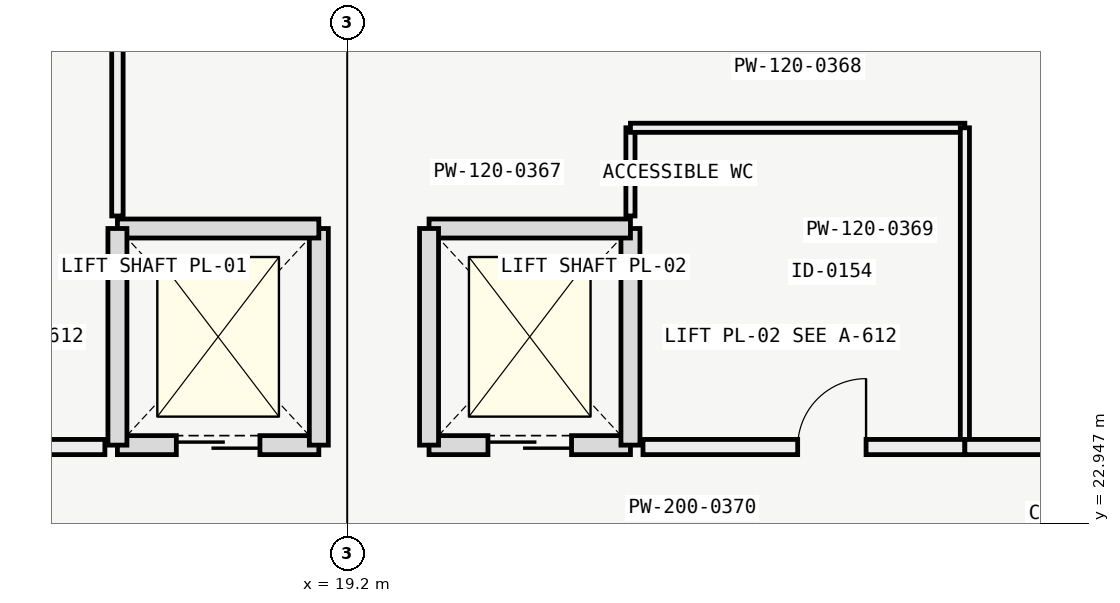
"""IFC4 building model, lengths in metres.
Left out: names, types, materials, properties, quantities, classifications, styles, units other than length and angle.
Written with IfcOpenShell. Run it as: python <this file> out.ifc"""

import sys

from ifc_helpers import new_model, si_unit, direction, frame, frame_2d, origin, place, context, subcontext, project, spatial, rectangle, extrude, element, fill, save


model = new_model("IFC4")
c1 = context("Model", 3, precision=1e-05, world=origin(), true_north=direction((0.0, 1.0)))
c2 = subcontext(c1, "Body", "Model", "MODEL_VIEW")
j1 = project(units=[si_unit("LENGTHUNIT", "METRE"), si_unit("PLANEANGLEUNIT", "RADIAN")], contexts=[c1])
p1 = place(None, origin())
s1 = spatial("IfcSite", under=j1, at=p1, CompositionType="ELEMENT")
p2 = place(p1, origin())
s2 = spatial("IfcBuilding", under=s1, at=p2, CompositionType="ELEMENT")
p3 = place(p2, frame((0.0, 0.0, 5.4)))
s3 = spatial("IfcBuildingStorey", under=s2, at=p3, CompositionType="ELEMENT", Elevation=5.4)
p4 = place(p3, frame((16.175, 23.975, 0.0), z_axis=(0.0, 0.0, 1.0), x_axis=(1.0, 0.0, 0.0)))
e1 = element("IfcWall", 1, at=p4, inside=s3, PredefinedType="SOLIDWALL", context=c2, shape_type="SweptSolid", body=[
    extrude(rectangle(XDim=2.65, YDim=0.25, at=frame_2d((1.325, 0.0))), origin(), (0.0, 0.0, 1.0), 3.92),
])
p5 = place(p4, frame((0.775, 0.0, 0.0)))
e2 = element("IfcOpeningElement", 2, at=p5, cuts=e1, PredefinedType="OPENING", context=c2, shape_type="SweptSolid", body=[
    extrude(rectangle(XDim=1.1, YDim=2.1, at=frame_2d((0.55, 1.05))), frame((0.0, 0.135, 0.0), z_axis=(0.0, -1.0, 0.0), x_axis=(1.0, 0.0, 0.0)), (0.0, 0.0, 1.0), 0.27),
])
p6 = place(p3, frame((18.825, 23.975, 0.0), z_axis=(0.0, 0.0, 1.0), x_axis=(0.0, 1.0, 0.0)))
e3 = element("IfcWall", 3, at=p6, inside=s3, PredefinedType="SOLIDWALL", context=c2, shape_type="SweptSolid", body=[
    extrude(rectangle(XDim=2.85, YDim=0.25, at=frame_2d((1.425, 0.0))), origin(), (0.0, 0.0, 1.0), 3.92),
])
p7 = place(p3, frame((18.825, 26.825, 0.0), z_axis=(0.0, 0.0, 1.0), x_axis=(-1.0, 0.0, 0.0)))
e4 = element("IfcWall", 4, at=p7, inside=s3, PredefinedType="SOLIDWALL", context=c2, shape_type="SweptSolid", body=[
    extrude(rectangle(XDim=2.65, YDim=0.25, at=frame_2d((1.325, 0.0))), origin(), (0.0, 0.0, 1.0), 3.92),
])
p8 = place(p3, frame((16.175, 26.825, 0.0), z_axis=(0.0, 0.0, 1.0), x_axis=(0.0, -1.0, 0.0)))
e5 = element("IfcWall", 5, at=p8, inside=s3, PredefinedType="SOLIDWALL", context=c2, shape_type="SweptSolid", body=[
    extrude(rectangle(XDim=2.85, YDim=0.25, at=frame_2d((1.425, 0.0))), origin(), (0.0, 0.0, 1.0), 3.92),
])
p9 = place(p3, frame((20.275, 23.975, 0.0), z_axis=(0.0, 0.0, 1.0), x_axis=(1.0, 0.0, 0.0)))
e6 = element("IfcWall", 6, at=p9, inside=s3, PredefinedType="SOLIDWALL", context=c2, shape_type="SweptSolid", body=[
    extrude(rectangle(XDim=2.65, YDim=0.25, at=frame_2d((1.325, 0.0))), origin(), (0.0, 0.0, 1.0), 3.92),
])
p10 = place(p9, frame((0.775, 0.0, 0.0)))
e7 = element("IfcOpeningElement", 7, at=p10, cuts=e6, PredefinedType="OPENING", context=c2, shape_type="SweptSolid", body=[
    extrude(rectangle(XDim=1.1, YDim=2.1, at=frame_2d((0.55, 1.05))), frame((0.0, 0.135, 0.0), z_axis=(0.0, -1.0, 0.0), x_axis=(1.0, 0.0, 0.0)), (0.0, 0.0, 1.0), 0.27),
])
p11 = place(p3, frame((22.925, 23.975, 0.0), z_axis=(0.0, 0.0, 1.0), x_axis=(0.0, 1.0, 0.0)))
e8 = element("IfcWall", 8, at=p11, inside=s3, PredefinedType="SOLIDWALL", context=c2, shape_type="SweptSolid", body=[
    extrude(rectangle(XDim=2.85, YDim=0.25, at=frame_2d((1.425, 0.0))), origin(), (0.0, 0.0, 1.0), 3.92),
])
p12 = place(p3, frame((22.925, 26.825, 0.0), z_axis=(0.0, 0.0, 1.0), x_axis=(-1.0, 0.0, 0.0)))
e9 = element("IfcWall", 9, at=p12, inside=s3, PredefinedType="SOLIDWALL", context=c2, shape_type="SweptSolid", body=[
    extrude(rectangle(XDim=2.65, YDim=0.25, at=frame_2d((1.325, 0.0))), origin(), (0.0, 0.0, 1.0), 3.92),
])
p13 = place(p3, frame((20.275, 26.825, 0.0), z_axis=(0.0, 0.0, 1.0), x_axis=(0.0, -1.0, 0.0)))
e10 = element("IfcWall", 10, at=p13, inside=s3, PredefinedType="SOLIDWALL", context=c2, shape_type="SweptSolid", body=[
    extrude(rectangle(XDim=2.85, YDim=0.25, at=frame_2d((1.425, 0.0))), origin(), (0.0, 0.0, 1.0), 3.92),
])
p14 = place(p3, frame((22.925, 26.99, 0.0), z_axis=(0.0, 0.0, 1.0), x_axis=(0.0, 1.0, 0.0)))
e11 = element("IfcWall", 11, at=p14, inside=s3, PredefinedType="PARTITIONING", context=c2, shape_type="SweptSolid", body=[
    extrude(rectangle(XDim=1.16, YDim=0.12, at=frame_2d((0.58, 0.0))), origin(), (0.0, 0.0, 1.0), 3.85),
])
p15 = place(p3, frame((22.925, 28.15, 0.0), z_axis=(0.0, 0.0, 1.0), x_axis=(1.0, 0.0, 0.0)))
e12 = element("IfcWall", 12, at=p15, inside=s3, PredefinedType="PARTITIONING", context=c2, shape_type="SweptSolid", body=[
    extrude(rectangle(XDim=4.4, YDim=0.12, at=frame_2d((2.2, 0.0))), origin(), (0.0, 0.0, 1.0), 3.85),
])
p16 = place(p3, frame((27.325, 23.95, 0.0), z_axis=(0.0, 0.0, 1.0), x_axis=(0.0, 1.0, 0.0)))
e13 = element("IfcWall", 13, at=p16, inside=s3, PredefinedType="PARTITIONING", context=c2, shape_type="SweptSolid", body=[
    extrude(rectangle(XDim=4.2, YDim=0.12, at=frame_2d((2.1, 0.0))), origin(), (0.0, 0.0, 1.0), 3.85),
])
p17 = place(p3, frame((23.09, 23.95, 0.0), z_axis=(0.0, 0.0, 1.0), x_axis=(1.0, 0.0, 0.0)))
e14 = element("IfcWall", 14, at=p17, inside=s3, PredefinedType="PARTITIONING", context=c2, shape_type="SweptSolid", body=[
    extrude(rectangle(XDim=4.235, YDim=0.2, at=frame_2d((2.117, 0.0))), origin(), (0.0, 0.0, 1.0), 3.85),
])
p18 = place(p17, frame((2.035, 0.0, 0.0)))
e15 = element("IfcOpeningElement", 15, at=p18, cuts=e14, PredefinedType="OPENING", context=c2, shape_type="SweptSolid", body=[
    extrude(rectangle(XDim=0.9, YDim=2.05, at=frame_2d((0.45, 1.025))), frame((0.0, 0.11, 0.0), z_axis=(0.0, -1.0, 0.0), x_axis=(1.0, 0.0, 0.0)), (0.0, 0.0, 1.0), 0.22),
])
p19 = place(p3, frame((16.175, 26.99, 0.0), z_axis=(0.0, 0.0, 1.0), x_axis=(0.0, 1.0, 0.0)))
e16 = element("IfcWall", 16, at=p19, inside=s3, PredefinedType="PARTITIONING", context=c2, shape_type="SweptSolid", body=[
    extrude(rectangle(XDim=13.66, YDim=0.15, at=frame_2d((6.83, 0.0))), origin(), (0.0, 0.0, 1.0), 3.2),
])
p20 = place(p3, frame((0.15, 23.95, 0.0), z_axis=(0.0, 0.0, 1.0), x_axis=(1.0, 0.0, 0.0)))
e17 = element("IfcWall", 17, at=p20, inside=s3, PredefinedType="PARTITIONING", context=c2, shape_type="SweptSolid", body=[
    extrude(rectangle(XDim=15.86, YDim=0.2, at=frame_2d((7.93, 0.0))), origin(), (0.0, 0.0, 1.0), 3.25),
])
p21 = place(p20, frame((6.05, 0.0, 0.0)))
e18 = element("IfcOpeningElement", 18, at=p21, cuts=e17, PredefinedType="OPENING", context=c2, shape_type="SweptSolid", body=[
    extrude(rectangle(XDim=1.4, YDim=2.2, at=frame_2d((0.7, 1.1))), frame((0.0, 0.11, 0.0), z_axis=(0.0, -1.0, 0.0), x_axis=(1.0, 0.0, 0.0)), (0.0, 0.0, 1.0), 0.22),
])
p22 = place(p3, frame((27.325, 23.95, 0.0), z_axis=(0.0, 0.0, 1.0), x_axis=(1.0, 0.0, 0.0)))
e19 = element("IfcWall", 19, at=p22, inside=s3, PredefinedType="PARTITIONING", context=c2, shape_type="SweptSolid", body=[
    extrude(rectangle(XDim=6.985, YDim=0.2, at=frame_2d((3.493, 0.0))), origin(), (0.0, 0.0, 1.0), 3.25),
])
p23 = place(p22, frame((4.1, 0.0, 0.0)))
e20 = element("IfcOpeningElement", 20, at=p23, cuts=e19, PredefinedType="OPENING", context=c2, shape_type="SweptSolid", body=[
    extrude(rectangle(XDim=1.4, YDim=2.2, at=frame_2d((0.7, 1.1))), frame((0.0, 0.11, 0.0), z_axis=(0.0, -1.0, 0.0), x_axis=(1.0, 0.0, 0.0)), (0.0, 0.0, 1.0), 0.22),
])
p24 = place(p5, origin())
e21 = element("IfcDoor", 21, at=p24, inside=s3, OperationType="SLIDING_TO_LEFT", PredefinedType="DOOR", context=c2, shape_type="SweptSolid", body=[
    extrude(rectangle(XDim=1.1, YDim=2.1, at=frame_2d((0.55, 1.05))), frame((0.0, 0.025, 0.0), z_axis=(0.0, -1.0, 0.0), x_axis=(1.0, 0.0, 0.0)), (0.0, 0.0, 1.0), 0.05),
])
fill(e2, e21)
p25 = place(p10, origin())
e22 = element("IfcDoor", 22, at=p25, inside=s3, OperationType="SLIDING_TO_LEFT", PredefinedType="DOOR", context=c2, shape_type="SweptSolid", body=[
    extrude(rectangle(XDim=1.1, YDim=2.1, at=frame_2d((0.55, 1.05))), frame((0.0, 0.025, 0.0), z_axis=(0.0, -1.0, 0.0), x_axis=(1.0, 0.0, 0.0)), (0.0, 0.0, 1.0), 0.05),
])
fill(e7, e22)
p26 = place(p18, origin())
e23 = element("IfcDoor", 23, at=p26, inside=s3, OperationType="SINGLE_SWING_RIGHT", PredefinedType="DOOR", context=c2, shape_type="SweptSolid", body=[
    extrude(rectangle(XDim=0.9, YDim=2.05, at=frame_2d((0.45, 1.025))), frame((0.0, 0.025, 0.0), z_axis=(0.0, -1.0, 0.0), x_axis=(1.0, 0.0, 0.0)), (0.0, 0.0, 1.0), 0.05),
])
fill(e15, e23)
save(model, sys.argv[1])
